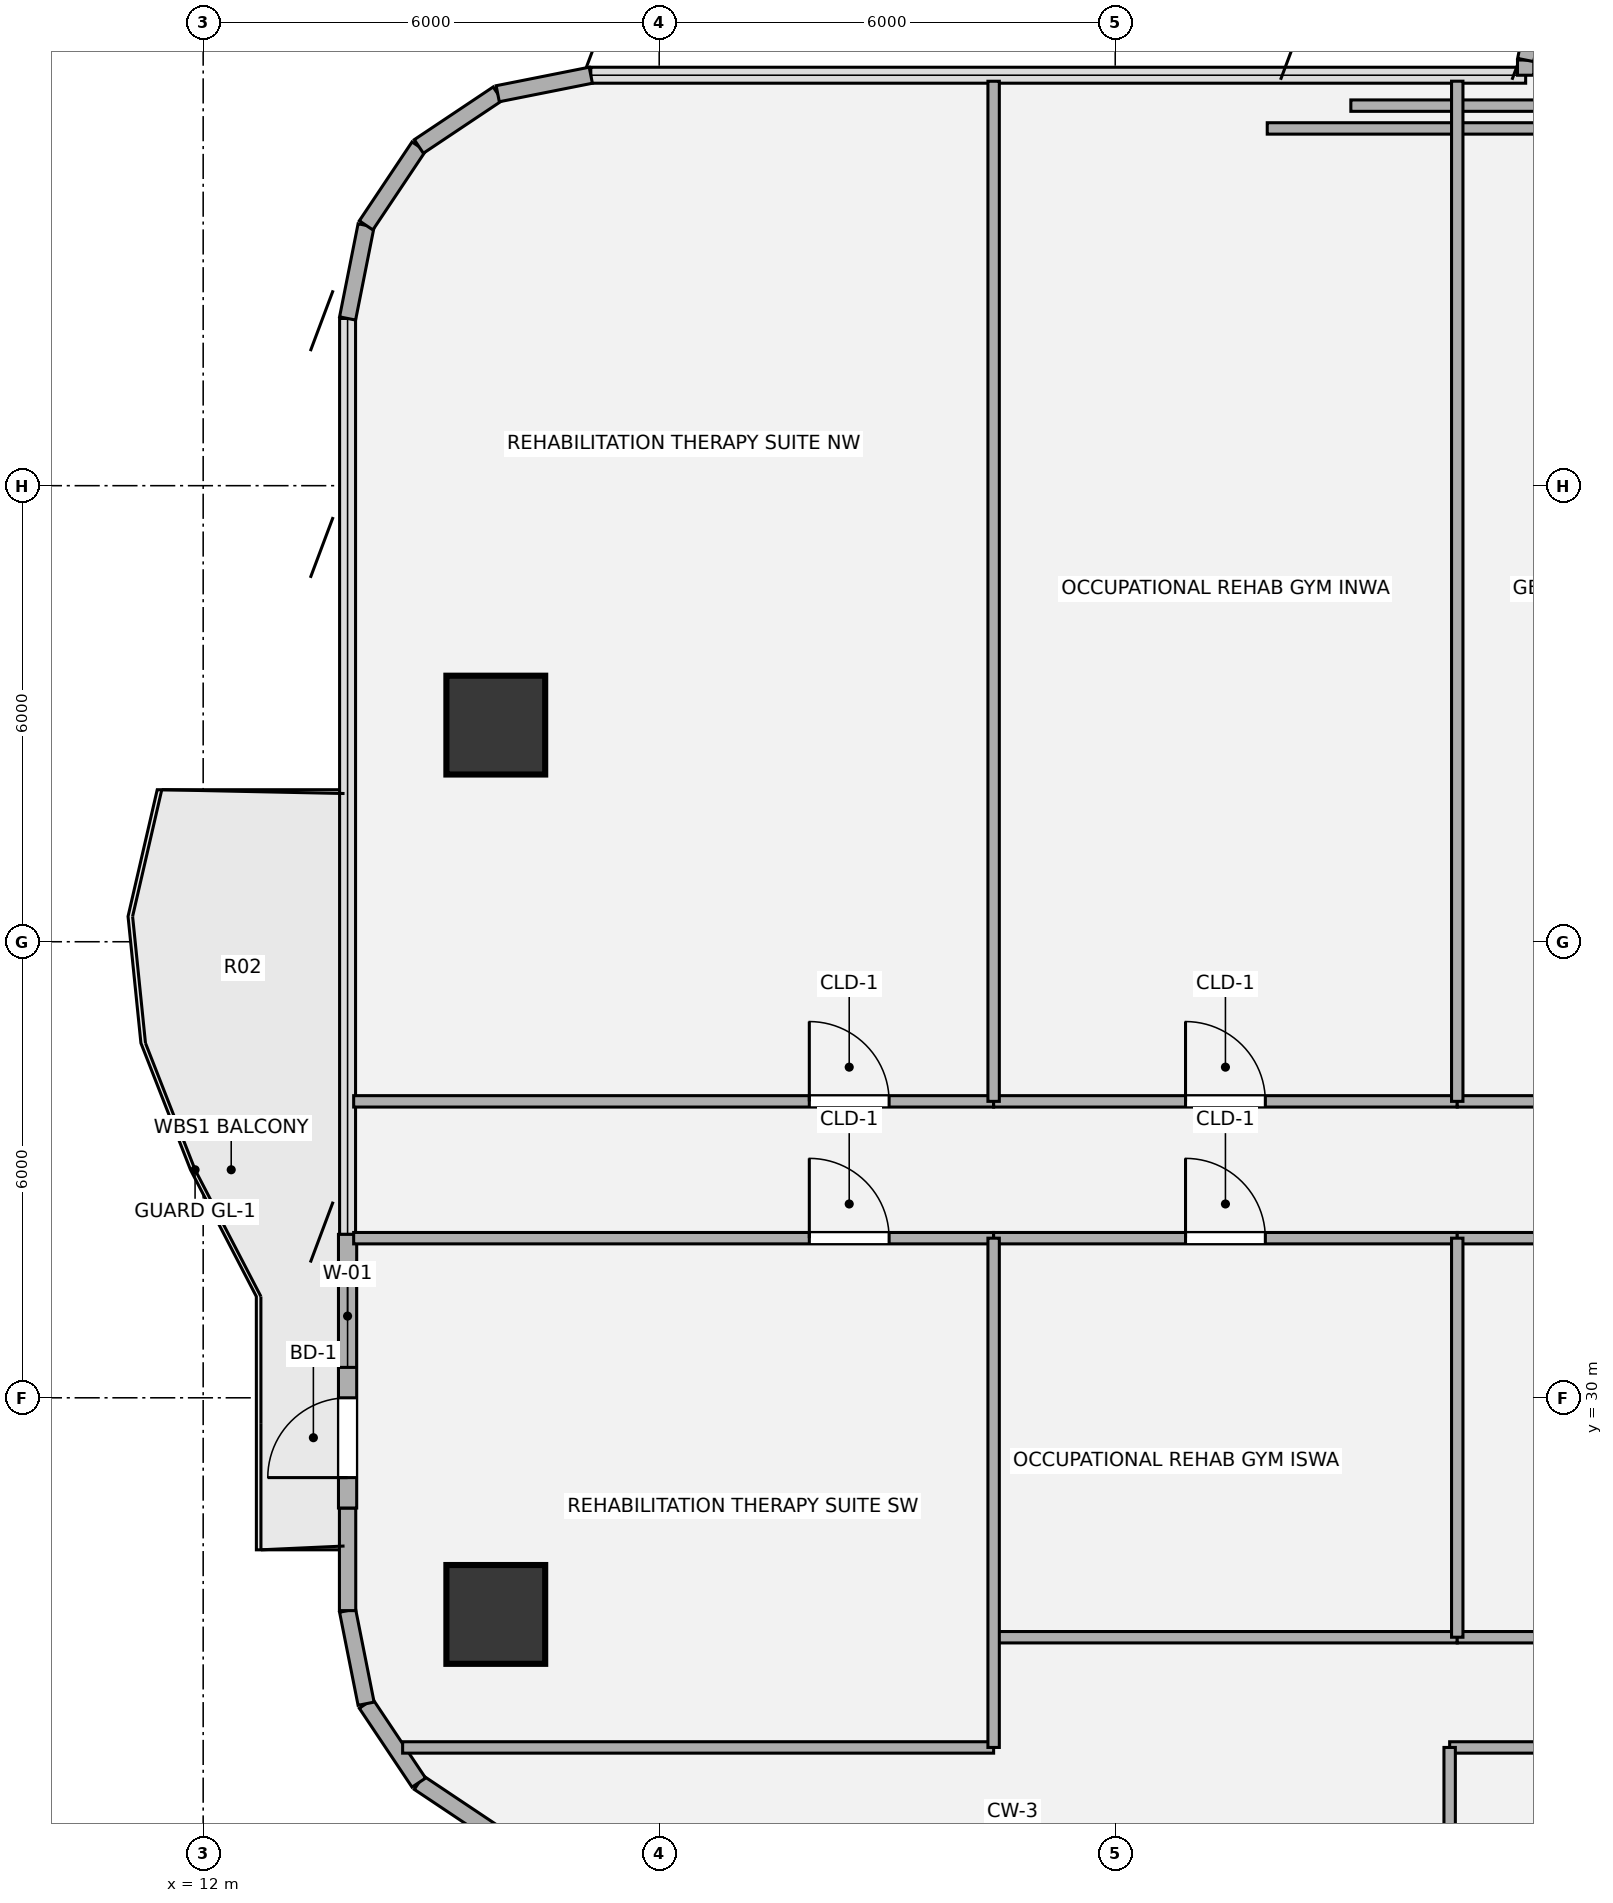
"""IFC4 building model, lengths in metres.
Left out: names, types, materials, properties, quantities, classifications, styles, units other than length and angle.
Written with IfcOpenShell. Run it as: python <this file> out.ifc"""

import sys

from ifc_helpers import new_model, si_unit, direction, frame, frame_2d, origin, origin_2d, place, context, subcontext, project, spatial, rectangle, hollow_circle, extrude, source, transform, mapped, element, fill, save


model = new_model("IFC4")
c1 = context("Model", 3, precision=1e-05, world=origin(), true_north=direction((0.0, 1.0)))
c2 = subcontext(c1, "Body", "Model", "MODEL_VIEW")
j1 = project(units=[si_unit("LENGTHUNIT", "METRE"), si_unit("PLANEANGLEUNIT", "RADIAN")], contexts=[c1])
p1 = place(None, origin())
s1 = spatial("IfcSite", under=j1, at=p1, CompositionType="ELEMENT")
p2 = place(p1, origin())
s2 = spatial("IfcBuilding", under=s1, at=p2, CompositionType="ELEMENT")
p3 = place(p2, frame((0.0, 0.0, 116.28)))
s3 = spatial("IfcBuildingStorey", under=s2, at=p3, CompositionType="ELEMENT", Elevation=116.28)
m1 = source(origin(), c2, "Body", "SweptSolid", [
    extrude(hollow_circle(Radius=0.65, WallThickness=0.045, at=origin_2d()), origin(), (0.0, 0.0, 1.0), 3.78),
])
for number, where, z_axis, x_axis in (
    (1, (15.85, 27.15, 0.0), (0.0, 0.0, 1.0), (1.0, 0.0, 0.0)),
    (2, (15.85, 38.85, 0.0), (0.0, 0.0, 1.0), (1.0, 0.0, 0.0)),
):
    element("IfcColumn", number, at=place(p3, frame(where, z_axis=z_axis, x_axis=x_axis)), inside=s3, PredefinedType="COLUMN", context=c2, shape_type="MappedRepresentation", body=[
        mapped(m1, transform((0.0, 0.0, 0.0), x_axis=(1.0, 0.0, 0.0), y_axis=(0.0, 1.0, 0.0), z_axis=(0.0, 0.0, 1.0), scale=1.0)),
    ])
for number, where, z_axis, x_axis in (
    (3, (15.875, 24.244, 0.0), (0.0, 0.0, 1.0), (-0.831, 0.556, 0.0)),
    (4, (14.837, 24.937, 0.0), (0.0, 0.0, 1.0), (-0.556, 0.831, 0.0)),
    (5, (14.144, 25.975, 0.0), (0.0, 0.0, 1.0), (-0.195, 0.981, 0.0)),
):
    element("IfcWall", number, at=place(p3, frame(where, z_axis=z_axis, x_axis=x_axis)), inside=s3, PredefinedType="SOLIDWALL", context=c2, shape_type="SweptSolid", body=[
        extrude(rectangle(XDim=1.249, YDim=0.215, at=frame_2d((0.624, 0.0))), origin(), (0.0, 0.0, 1.0), 3.53),
    ])
p4 = place(p3, frame((13.9, 27.2, 0.0), z_axis=(0.0, 0.0, 1.0), x_axis=(0.0, 1.0, 0.0)))
e6 = element("IfcWall", 6, at=p4, inside=s3, PredefinedType="SOLIDWALL", context=c2, shape_type="SweptSolid", body=[
    extrude(rectangle(XDim=1.35, YDim=0.215, at=frame_2d((0.675, 0.0))), origin(), (0.0, 0.0, 1.0), 3.53),
])
p5 = place(p3, frame((13.9, 28.55, 0.0), z_axis=(0.0, 0.0, 1.0), x_axis=(0.0, 1.0, 0.0)))
e7 = element("IfcWall", 7, at=p5, inside=s3, PredefinedType="SOLIDWALL", context=c2, shape_type="SweptSolid", body=[
    extrude(rectangle(XDim=3.6, YDim=0.24, at=frame_2d((1.8, 0.0))), origin(), (0.0, 0.0, 1.0), 3.53),
])
p6 = place(p5, frame((0.4, 0.0, 0.0)))
e8 = element("IfcOpeningElement", 8, at=p6, cuts=e7, PredefinedType="OPENING", context=c2, shape_type="SweptSolid", body=[
    extrude(rectangle(XDim=1.05, YDim=2.15, at=origin_2d()), frame((0.525, 0.13, 1.075), z_axis=(0.0, -1.0, 0.0), x_axis=(1.0, 0.0, 0.0)), (0.0, 0.0, 1.0), 0.26),
])
p7 = place(p5, frame((1.85, 0.0, 0.85)))
e9 = element("IfcOpeningElement", 9, at=p7, cuts=e7, PredefinedType="OPENING", context=c2, shape_type="SweptSolid", body=[
    extrude(rectangle(XDim=1.35, YDim=1.35, at=origin_2d()), frame((0.675, 0.13, 0.675), z_axis=(0.0, -1.0, 0.0), x_axis=(1.0, 0.0, 0.0)), (0.0, 0.0, 1.0), 0.26),
])
for number, where, z_axis, x_axis in (
    (10, (13.9, 44.2, 0.0), (0.0, 0.0, 1.0), (0.195, 0.981, 0.0)),
    (11, (14.144, 45.425, 0.0), (0.0, 0.0, 1.0), (0.556, 0.831, 0.0)),
    (12, (14.837, 46.463, 0.0), (0.0, 0.0, 1.0), (0.831, 0.556, 0.0)),
    (13, (15.875, 47.156, 0.0), (0.0, 0.0, 1.0), (0.981, 0.195, 0.0)),
):
    element("IfcWall", number, at=place(p3, frame(where, z_axis=z_axis, x_axis=x_axis)), inside=s3, PredefinedType="SOLIDWALL", context=c2, shape_type="SweptSolid", body=[
        extrude(rectangle(XDim=1.249, YDim=0.215, at=frame_2d((0.624, 0.0))), origin(), (0.0, 0.0, 1.0), 3.53),
    ])
p8 = place(p3, frame((29.4, 47.4, 0.0), z_axis=(0.0, 0.0, 1.0), x_axis=(0.0, 1.0, 0.0)))
e14 = element("IfcWall", 14, at=p8, inside=s3, PredefinedType="SOLIDWALL", context=c2, shape_type="SweptSolid", body=[
    extrude(rectangle(XDim=0.2, YDim=0.215, at=frame_2d((0.1, 0.0))), origin(), (0.0, 0.0, 1.0), 3.53),
])
p9 = place(p3, frame((29.4, 47.6, 0.0), z_axis=(0.0, 0.0, 1.0), x_axis=(0.195127417394, 0.980777900945, 0.0)))
e15 = element("IfcWall", 15, at=p9, inside=s3, PredefinedType="SOLIDWALL", context=c2, shape_type="SweptSolid", body=[
    extrude(rectangle(XDim=1.092, YDim=0.215, at=frame_2d((0.546, 0.0))), origin(), (0.0, 0.0, 1.0), 3.53),
])
p10 = place(p3, frame((14.624, 25.4, 0.0), z_axis=(0.0, 0.0, 1.0), x_axis=(1.0, 0.0, 0.0)))
e16 = element("IfcWall", 16, at=p10, inside=s3, PredefinedType="PARTITIONING", context=c2, shape_type="SweptSolid", body=[
    extrude(rectangle(XDim=7.776, YDim=0.15, at=frame_2d((3.888, 0.0))), origin(), (0.0, 0.0, 1.0), 3.5),
])
p11 = place(p3, frame((28.4, 25.4, 0.0), z_axis=(0.0, 0.0, 1.0), x_axis=(1.0, 0.0, 0.0)))
e17 = element("IfcWall", 17, at=p11, inside=s3, PredefinedType="PARTITIONING", context=c2, shape_type="SweptSolid", body=[
    extrude(rectangle(XDim=6.7, YDim=0.15, at=frame_2d((3.35, 0.0))), origin(), (0.0, 0.0, 1.0), 3.5),
])
p12 = place(p3, frame((22.4, 26.85, 0.0), z_axis=(0.0, 0.0, 1.0), x_axis=(1.0, 0.0, 0.0)))
e18 = element("IfcWall", 18, at=p12, inside=s3, PredefinedType="PARTITIONING", context=c2, shape_type="SweptSolid", body=[
    extrude(rectangle(XDim=6.1, YDim=0.15, at=frame_2d((3.05, 0.0))), origin(), (0.0, 0.0, 1.0), 3.055),
])
p13 = place(p3, frame((28.5, 26.85, 0.0), z_axis=(0.0, 0.0, 1.0), x_axis=(1.0, 0.0, 0.0)))
e19 = element("IfcWall", 19, at=p13, inside=s3, PredefinedType="PARTITIONING", context=c2, shape_type="SweptSolid", body=[
    extrude(rectangle(XDim=6.6, YDim=0.15, at=frame_2d((3.3, 0.0))), origin(), (0.0, 0.0, 1.0), 2.903),
])
p14 = place(p3, frame((13.98, 32.1, 0.0), z_axis=(0.0, 0.0, 1.0), x_axis=(1.0, 0.0, 0.0)))
e20 = element("IfcWall", 20, at=p14, inside=s3, PredefinedType="PARTITIONING", context=c2, shape_type="SweptSolid", body=[
    extrude(rectangle(XDim=8.42, YDim=0.15, at=frame_2d((4.21, 0.0))), origin(), (0.0, 0.0, 1.0), 2.982),
])
p15 = place(p14, frame((5.995, 0.0, 0.0)))
e21 = element("IfcOpeningElement", 21, at=p15, cuts=e20, PredefinedType="OPENING", context=c2, shape_type="SweptSolid", body=[
    extrude(rectangle(XDim=1.05, YDim=2.1, at=origin_2d()), frame((0.525, 0.085, 1.05), z_axis=(0.0, -1.0, 0.0), x_axis=(1.0, 0.0, 0.0)), (0.0, 0.0, 1.0), 0.17),
])
p16 = place(p3, frame((22.4, 32.1, 0.0), z_axis=(0.0, 0.0, 1.0), x_axis=(1.0, 0.0, 0.0)))
e22 = element("IfcWall", 22, at=p16, inside=s3, PredefinedType="PARTITIONING", context=c2, shape_type="SweptSolid", body=[
    extrude(rectangle(XDim=6.1, YDim=0.15, at=frame_2d((3.05, 0.0))), origin(), (0.0, 0.0, 1.0), 2.982),
])
p17 = place(p16, frame((2.525, 0.0, 0.0)))
e23 = element("IfcOpeningElement", 23, at=p17, cuts=e22, PredefinedType="OPENING", context=c2, shape_type="SweptSolid", body=[
    extrude(rectangle(XDim=1.05, YDim=2.1, at=origin_2d()), frame((0.525, 0.085, 1.05), z_axis=(0.0, -1.0, 0.0), x_axis=(1.0, 0.0, 0.0)), (0.0, 0.0, 1.0), 0.17),
])
p18 = place(p3, frame((28.5, 32.1, 0.0), z_axis=(0.0, 0.0, 1.0), x_axis=(1.0, 0.0, 0.0)))
e24 = element("IfcWall", 24, at=p18, inside=s3, PredefinedType="PARTITIONING", context=c2, shape_type="SweptSolid", body=[
    extrude(rectangle(XDim=6.6, YDim=0.15, at=frame_2d((3.3, 0.0))), origin(), (0.0, 0.0, 1.0), 2.982),
])
p19 = place(p18, frame((2.775, 0.0, 0.0)))
e25 = element("IfcOpeningElement", 25, at=p19, cuts=e24, PredefinedType="OPENING", context=c2, shape_type="SweptSolid", body=[
    extrude(rectangle(XDim=1.05, YDim=2.1, at=origin_2d()), frame((0.525, 0.085, 1.05), z_axis=(0.0, -1.0, 0.0), x_axis=(1.0, 0.0, 0.0)), (0.0, 0.0, 1.0), 0.17),
])
p20 = place(p3, frame((13.98, 33.9, 0.0), z_axis=(0.0, 0.0, 1.0), x_axis=(1.0, 0.0, 0.0)))
e26 = element("IfcWall", 26, at=p20, inside=s3, PredefinedType="PARTITIONING", context=c2, shape_type="SweptSolid", body=[
    extrude(rectangle(XDim=8.42, YDim=0.15, at=frame_2d((4.21, 0.0))), origin(), (0.0, 0.0, 1.0), 2.982),
])
p21 = place(p20, frame((5.995, 0.0, 0.0)))
e27 = element("IfcOpeningElement", 27, at=p21, cuts=e26, PredefinedType="OPENING", context=c2, shape_type="SweptSolid", body=[
    extrude(rectangle(XDim=1.05, YDim=2.1, at=origin_2d()), frame((0.525, 0.085, 1.05), z_axis=(0.0, -1.0, 0.0), x_axis=(1.0, 0.0, 0.0)), (0.0, 0.0, 1.0), 0.17),
])
p22 = place(p3, frame((22.4, 33.9, 0.0), z_axis=(0.0, 0.0, 1.0), x_axis=(1.0, 0.0, 0.0)))
e28 = element("IfcWall", 28, at=p22, inside=s3, PredefinedType="PARTITIONING", context=c2, shape_type="SweptSolid", body=[
    extrude(rectangle(XDim=6.1, YDim=0.15, at=frame_2d((3.05, 0.0))), origin(), (0.0, 0.0, 1.0), 2.982),
])
p23 = place(p22, frame((2.525, 0.0, 0.0)))
e29 = element("IfcOpeningElement", 29, at=p23, cuts=e28, PredefinedType="OPENING", context=c2, shape_type="SweptSolid", body=[
    extrude(rectangle(XDim=1.05, YDim=2.1, at=origin_2d()), frame((0.525, 0.085, 1.05), z_axis=(0.0, -1.0, 0.0), x_axis=(1.0, 0.0, 0.0)), (0.0, 0.0, 1.0), 0.17),
])
p24 = place(p3, frame((28.5, 33.9, 0.0), z_axis=(0.0, 0.0, 1.0), x_axis=(1.0, 0.0, 0.0)))
e30 = element("IfcWall", 30, at=p24, inside=s3, PredefinedType="PARTITIONING", context=c2, shape_type="SweptSolid", body=[
    extrude(rectangle(XDim=6.6, YDim=0.15, at=frame_2d((3.3, 0.0))), origin(), (0.0, 0.0, 1.0), 2.982),
])
p25 = place(p24, frame((2.775, 0.0, 0.0)))
e31 = element("IfcOpeningElement", 31, at=p25, cuts=e30, PredefinedType="OPENING", context=c2, shape_type="SweptSolid", body=[
    extrude(rectangle(XDim=1.05, YDim=2.1, at=origin_2d()), frame((0.525, 0.085, 1.05), z_axis=(0.0, -1.0, 0.0), x_axis=(1.0, 0.0, 0.0)), (0.0, 0.0, 1.0), 0.17),
])
p26 = place(p3, frame((26.0, 46.7, 0.0), z_axis=(0.0, 0.0, 1.0), x_axis=(1.0, 0.0, 0.0)))
e32 = element("IfcWall", 32, at=p26, inside=s3, PredefinedType="PARTITIONING", context=c2, shape_type="SweptSolid", body=[
    extrude(rectangle(XDim=9.1, YDim=0.15, at=frame_2d((4.55, 0.0))), origin(), (0.0, 0.0, 1.0), 3.308),
])
p27 = place(p3, frame((27.1, 47.0, 0.0), z_axis=(0.0, 0.0, 1.0), x_axis=(1.0, 0.0, 0.0)))
e33 = element("IfcWall", 33, at=p27, inside=s3, PredefinedType="PARTITIONING", context=c2, shape_type="SweptSolid", body=[
    extrude(rectangle(XDim=17.8, YDim=0.15, at=frame_2d((8.9, 0.0))), origin(), (0.0, 0.0, 1.0), 3.308),
])
p28 = place(p27, frame((8.375, 0.0, 0.0)))
e34 = element("IfcOpeningElement", 34, at=p28, cuts=e33, PredefinedType="OPENING", context=c2, shape_type="SweptSolid", body=[
    extrude(rectangle(XDim=1.05, YDim=2.1, at=origin_2d()), frame((0.525, 0.085, 1.05), z_axis=(0.0, -1.0, 0.0), x_axis=(1.0, 0.0, 0.0)), (0.0, 0.0, 1.0), 0.17),
])
p29 = place(p3, frame((22.4, 25.4, 0.0), z_axis=(0.0, 0.0, 1.0), x_axis=(0.0, 1.0, 0.0)))
e35 = element("IfcWall", 35, at=p29, inside=s3, PredefinedType="PARTITIONING", context=c2, shape_type="SweptSolid", body=[
    extrude(rectangle(XDim=6.7, YDim=0.15, at=frame_2d((3.35, 0.0))), origin(), (0.0, 0.0, 1.0), 3.5),
])
p30 = place(p3, frame((22.4, 33.9, 0.0), z_axis=(0.0, 0.0, 1.0), x_axis=(0.0, 1.0, 0.0)))
e36 = element("IfcWall", 36, at=p30, inside=s3, PredefinedType="PARTITIONING", context=c2, shape_type="SweptSolid", body=[
    extrude(rectangle(XDim=13.421, YDim=0.15, at=frame_2d((6.71, 0.0))), origin(), (0.0, 0.0, 1.0), 3.5),
])
p31 = place(p3, frame((28.4, 21.957, 0.0), z_axis=(0.0, 0.0, 1.0), x_axis=(0.0, 1.0, 0.0)))
e37 = element("IfcWall", 37, at=p31, inside=s3, PredefinedType="PARTITIONING", context=c2, shape_type="SweptSolid", body=[
    extrude(rectangle(XDim=3.443, YDim=0.15, at=frame_2d((1.721, 0.0))), origin(), (0.0, 0.0, 1.0), 3.5),
])
p32 = place(p3, frame((28.5, 26.85, 0.0), z_axis=(0.0, 0.0, 1.0), x_axis=(0.0, 1.0, 0.0)))
e38 = element("IfcWall", 38, at=p32, inside=s3, PredefinedType="PARTITIONING", context=c2, shape_type="SweptSolid", body=[
    extrude(rectangle(XDim=5.25, YDim=0.15, at=frame_2d((2.625, 0.0))), origin(), (0.0, 0.0, 1.0), 3.5),
])
p33 = place(p3, frame((28.5, 33.9, 0.0), z_axis=(0.0, 0.0, 1.0), x_axis=(0.0, 1.0, 0.0)))
e39 = element("IfcWall", 39, at=p33, inside=s3, PredefinedType="PARTITIONING", context=c2, shape_type="SweptSolid", body=[
    extrude(rectangle(XDim=13.421, YDim=0.15, at=frame_2d((6.711, 0.0))), origin(), (0.0, 0.0, 1.0), 3.5),
])
m2 = source(origin(), c2, "Body", "SweptSolid", [
    extrude(rectangle(XDim=1.05, YDim=2.15, at=origin_2d()), frame((0.525, 0.025, 1.075), z_axis=(0.0, -1.0, 0.0), x_axis=(1.0, 0.0, 0.0)), (0.0, 0.0, 1.0), 0.05),
])
p34 = place(p6, origin())
e40 = element("IfcDoor", 40, at=p34, inside=s3, OperationType="SINGLE_SWING_LEFT", PredefinedType="DOOR", context=c2, shape_type="MappedRepresentation", body=[
    mapped(m2, transform((0.0, 0.0, 0.0), x_axis=(1.0, 0.0, 0.0), y_axis=(0.0, 1.0, 0.0), z_axis=(0.0, 0.0, 1.0), scale=1.0)),
])
fill(e8, e40)
m3 = source(origin(), c2, "Body", "SweptSolid", [
    extrude(rectangle(XDim=1.35, YDim=1.35, at=origin_2d()), frame((0.675, 0.03, 0.675), z_axis=(0.0, -1.0, 0.0), x_axis=(1.0, 0.0, 0.0)), (0.0, 0.0, 1.0), 0.06),
])
p35 = place(p7, origin())
e41 = element("IfcWindow", 41, at=p35, inside=s3, PartitioningType="SINGLE_PANEL", PredefinedType="WINDOW", context=c2, shape_type="MappedRepresentation", body=[
    mapped(m3, transform((0.0, 0.0, 0.0), x_axis=(1.0, 0.0, 0.0), y_axis=(0.0, 1.0, 0.0), z_axis=(0.0, 0.0, 1.0), scale=1.0)),
])
fill(e9, e41)
m4 = source(origin(), c2, "Body", "SweptSolid", [
    extrude(rectangle(XDim=1.05, YDim=2.1, at=origin_2d()), frame((0.525, 0.025, 1.05), z_axis=(0.0, -1.0, 0.0), x_axis=(1.0, 0.0, 0.0)), (0.0, 0.0, 1.0), 0.05),
])
p36 = place(p15, origin())
e42 = element("IfcDoor", 42, at=p36, inside=s3, OperationType="SINGLE_SWING_LEFT", PredefinedType="DOOR", context=c2, shape_type="MappedRepresentation", body=[
    mapped(m4, transform((0.0, 0.0, 0.0), x_axis=(1.0, 0.0, 0.0), y_axis=(0.0, 1.0, 0.0), z_axis=(0.0, 0.0, 1.0), scale=1.0)),
])
fill(e21, e42)
p37 = place(p17, origin())
e43 = element("IfcDoor", 43, at=p37, inside=s3, OperationType="SINGLE_SWING_LEFT", PredefinedType="DOOR", context=c2, shape_type="MappedRepresentation", body=[
    mapped(m4, transform((0.0, 0.0, 0.0), x_axis=(1.0, 0.0, 0.0), y_axis=(0.0, 1.0, 0.0), z_axis=(0.0, 0.0, 1.0), scale=1.0)),
])
fill(e23, e43)
p38 = place(p21, origin())
e44 = element("IfcDoor", 44, at=p38, inside=s3, OperationType="SINGLE_SWING_LEFT", PredefinedType="DOOR", context=c2, shape_type="MappedRepresentation", body=[
    mapped(m4, transform((0.0, 0.0, 0.0), x_axis=(1.0, 0.0, 0.0), y_axis=(0.0, 1.0, 0.0), z_axis=(0.0, 0.0, 1.0), scale=1.0)),
])
fill(e27, e44)
p39 = place(p23, origin())
e45 = element("IfcDoor", 45, at=p39, inside=s3, OperationType="SINGLE_SWING_LEFT", PredefinedType="DOOR", context=c2, shape_type="MappedRepresentation", body=[
    mapped(m4, transform((0.0, 0.0, 0.0), x_axis=(1.0, 0.0, 0.0), y_axis=(0.0, 1.0, 0.0), z_axis=(0.0, 0.0, 1.0), scale=1.0)),
])
fill(e29, e45)
save(model, sys.argv[1])
